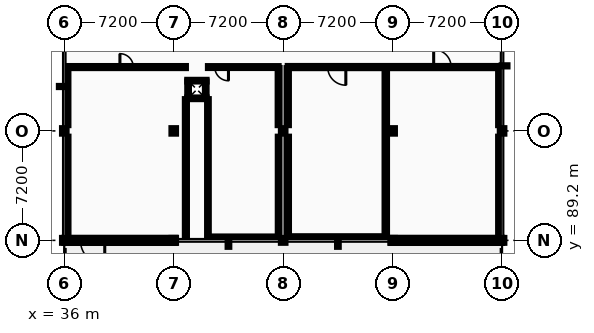
"""IFC4 building model, lengths in metres.
Left out: names, types, materials, properties, quantities, classifications, styles, units other than length and angle.
Written with IfcOpenShell. Run it as: python <this file> out.ifc"""

import sys

from ifc_helpers import new_model, si_unit, direction, frame, frame_2d, origin, origin_2d, place, context, subcontext, project, spatial, rectangle, i_section, extrude, element, fill, save


model = new_model("IFC4")
c1 = context("Model", 3, precision=1e-05, world=origin(), true_north=direction((0.0, 1.0)))
c2 = subcontext(c1, "Body", "Model", "MODEL_VIEW")
j1 = project(units=[si_unit("LENGTHUNIT", "METRE"), si_unit("PLANEANGLEUNIT", "RADIAN")], contexts=[c1])
p1 = place(None, origin())
s1 = spatial("IfcSite", under=j1, at=p1, CompositionType="ELEMENT")
p2 = place(p1, origin())
s2 = spatial("IfcBuilding", under=s1, at=p2, CompositionType="ELEMENT")
p3 = place(p2, frame((0.0, 0.0, 14.0)))
s3 = spatial("IfcBuildingStorey", under=s2, at=p3, CompositionType="ELEMENT", Elevation=14.0)
p4 = place(p3, frame((36.0, 89.2, 0.0), z_axis=(0.0, 0.0, 1.0), x_axis=(1.0, 0.0, 0.0)))
e1 = element("IfcColumn", 1, at=p4, inside=s3, PredefinedType="COLUMN", context=c2, shape_type="SweptSolid", body=[
    extrude(i_section(OverallWidth=0.3, OverallDepth=0.32, WebThickness=0.011, FlangeThickness=0.021, FilletRadius=0.027, at=origin_2d()), origin(), (0.0, 0.0, 1.0), 4.4),
])
p5 = place(p3, frame((36.0, 96.4, 0.0), z_axis=(0.0, 0.0, 1.0), x_axis=(1.0, 0.0, 0.0)))
e2 = element("IfcColumn", 2, at=p5, inside=s3, PredefinedType="COLUMN", context=c2, shape_type="SweptSolid", body=[
    extrude(i_section(OverallWidth=0.3, OverallDepth=0.36, WebThickness=0.012, FlangeThickness=0.022, FilletRadius=0.027, at=origin_2d()), origin(), (0.0, 0.0, 1.0), 4.4),
])
p6 = place(p3, frame((43.2, 89.2, 0.0), z_axis=(0.0, 0.0, 1.0), x_axis=(1.0, 0.0, 0.0)))
e3 = element("IfcColumn", 3, at=p6, inside=s3, PredefinedType="COLUMN", context=c2, shape_type="SweptSolid", body=[
    extrude(i_section(OverallWidth=0.3, OverallDepth=0.32, WebThickness=0.011, FlangeThickness=0.021, FilletRadius=0.027, at=origin_2d()), origin(), (0.0, 0.0, 1.0), 4.4),
])
p7 = place(p3, frame((43.2, 96.4, 0.0), z_axis=(0.0, 0.0, 1.0), x_axis=(1.0, 0.0, 0.0)))
e4 = element("IfcColumn", 4, at=p7, inside=s3, PredefinedType="COLUMN", context=c2, shape_type="SweptSolid", body=[
    extrude(i_section(OverallWidth=0.3, OverallDepth=0.36, WebThickness=0.012, FlangeThickness=0.022, FilletRadius=0.027, at=origin_2d()), origin(), (0.0, 0.0, 1.0), 4.4),
])
p8 = place(p3, frame((50.4, 89.2, 0.0), z_axis=(0.0, 0.0, 1.0), x_axis=(1.0, 0.0, 0.0)))
e5 = element("IfcColumn", 5, at=p8, inside=s3, PredefinedType="COLUMN", context=c2, shape_type="SweptSolid", body=[
    extrude(i_section(OverallWidth=0.3, OverallDepth=0.32, WebThickness=0.011, FlangeThickness=0.021, FilletRadius=0.027, at=origin_2d()), origin(), (0.0, 0.0, 1.0), 4.4),
])
p9 = place(p3, frame((50.4, 96.4, 0.0), z_axis=(0.0, 0.0, 1.0), x_axis=(1.0, 0.0, 0.0)))
e6 = element("IfcColumn", 6, at=p9, inside=s3, PredefinedType="COLUMN", context=c2, shape_type="SweptSolid", body=[
    extrude(i_section(OverallWidth=0.3, OverallDepth=0.36, WebThickness=0.012, FlangeThickness=0.022, FilletRadius=0.027, at=origin_2d()), origin(), (0.0, 0.0, 1.0), 4.4),
])
p10 = place(p3, frame((57.6, 89.2, 0.0), z_axis=(0.0, 0.0, 1.0), x_axis=(1.0, 0.0, 0.0)))
e7 = element("IfcColumn", 7, at=p10, inside=s3, PredefinedType="COLUMN", context=c2, shape_type="SweptSolid", body=[
    extrude(i_section(OverallWidth=0.3, OverallDepth=0.32, WebThickness=0.011, FlangeThickness=0.021, FilletRadius=0.027, at=origin_2d()), origin(), (0.0, 0.0, 1.0), 4.4),
])
p11 = place(p3, frame((57.6, 96.4, 0.0), z_axis=(0.0, 0.0, 1.0), x_axis=(1.0, 0.0, 0.0)))
e8 = element("IfcColumn", 8, at=p11, inside=s3, PredefinedType="COLUMN", context=c2, shape_type="SweptSolid", body=[
    extrude(i_section(OverallWidth=0.3, OverallDepth=0.36, WebThickness=0.012, FlangeThickness=0.022, FilletRadius=0.027, at=origin_2d()), origin(), (0.0, 0.0, 1.0), 4.4),
])
p12 = place(p3, frame((64.8, 89.2, 0.0), z_axis=(0.0, 0.0, 1.0), x_axis=(1.0, 0.0, 0.0)))
e9 = element("IfcColumn", 9, at=p12, inside=s3, PredefinedType="COLUMN", context=c2, shape_type="SweptSolid", body=[
    extrude(i_section(OverallWidth=0.3, OverallDepth=0.32, WebThickness=0.011, FlangeThickness=0.021, FilletRadius=0.027, at=origin_2d()), origin(), (0.0, 0.0, 1.0), 4.4),
])
p13 = place(p3, frame((64.8, 96.4, 0.0), z_axis=(0.0, 0.0, 1.0), x_axis=(1.0, 0.0, 0.0)))
e10 = element("IfcColumn", 10, at=p13, inside=s3, PredefinedType="COLUMN", context=c2, shape_type="SweptSolid", body=[
    extrude(i_section(OverallWidth=0.3, OverallDepth=0.36, WebThickness=0.012, FlangeThickness=0.022, FilletRadius=0.027, at=origin_2d()), origin(), (0.0, 0.0, 1.0), 4.4),
])
p14 = place(p3, frame((36.0, 89.2, 0.0), z_axis=(0.0, 0.0, 1.0), x_axis=(1.0, 0.0, 0.0)))
e11 = element("IfcWall", 11, at=p14, inside=s3, PredefinedType="STANDARD", context=c2, shape_type="SweptSolid", body=[
    extrude(rectangle(XDim=7.31, YDim=0.34, at=frame_2d((3.655, 0.0))), origin(), (0.0, 0.0, 1.0), 3.935),
])
p15 = place(p14, frame((1.062, 0.0, 0.0)))
e12 = element("IfcOpeningElement", 12, at=p15, cuts=e11, PredefinedType="OPENING", context=c2, shape_type="SweptSolid", body=[
    extrude(rectangle(XDim=1.6, YDim=2.2, at=frame_2d((0.8, 1.1))), frame((0.0, 0.18, 0.0), z_axis=(0.0, -1.0, 0.0), x_axis=(1.0, 0.0, 0.0)), (0.0, 0.0, 1.0), 0.36),
])
p16 = place(p3, frame((57.49, 89.2, 0.0), z_axis=(0.0, 0.0, 1.0), x_axis=(1.0, 0.0, 0.0)))
e13 = element("IfcWall", 13, at=p16, inside=s3, PredefinedType="STANDARD", context=c2, shape_type="SweptSolid", body=[
    extrude(rectangle(XDim=7.31, YDim=0.34, at=frame_2d((3.655, 0.0))), origin(), (0.0, 0.0, 1.0), 3.935),
])
for number, where, z_axis, x_axis in (
    (14, (44.09, 98.545, 0.0), (0.0, 0.0, 1.0), (1.0, 0.0, 0.0)),
    (15, (44.09, 99.705, 0.0), (0.0, 0.0, 1.0), (1.0, 0.0, 0.0)),
):
    element("IfcWall", number, at=place(p3, frame(where, z_axis=z_axis, x_axis=x_axis)), inside=s3, PredefinedType="PARTITIONING", context=c2, shape_type="SweptSolid", body=[
        extrude(rectangle(XDim=1.27, YDim=0.11, at=frame_2d((0.635, 0.0))), origin(), (0.0, 0.0, 1.0), 4.2),
    ])
for number, where, z_axis, x_axis in (
    (16, (44.145, 98.6, 0.0), (0.0, 0.0, 1.0), (0.0, 1.0, 0.0)),
    (17, (45.305, 98.6, 0.0), (0.0, 0.0, 1.0), (0.0, 1.0, 0.0)),
):
    element("IfcWall", number, at=place(p3, frame(where, z_axis=z_axis, x_axis=x_axis)), inside=s3, PredefinedType="PARTITIONING", context=c2, shape_type="SweptSolid", body=[
        extrude(rectangle(XDim=1.05, YDim=0.11, at=frame_2d((0.525, 0.0))), origin(), (0.0, 0.0, 1.0), 4.2),
    ])
p17 = place(p3, frame((45.45, 89.4, 0.0), z_axis=(0.0, 0.0, 1.0), x_axis=(1.0, 0.0, 0.0)))
e18 = element("IfcWall", 18, at=p17, inside=s3, PredefinedType="PARTITIONING", context=c2, shape_type="SweptSolid", body=[
    extrude(rectangle(XDim=4.57, YDim=0.11, at=frame_2d((2.285, 0.0))), origin(), (0.0, 0.0, 1.0), 3.935),
])
p18 = place(p3, frame((50.78, 89.4, 0.0), z_axis=(0.0, 0.0, 1.0), x_axis=(1.0, 0.0, 0.0)))
e19 = element("IfcWall", 19, at=p18, inside=s3, PredefinedType="PARTITIONING", context=c2, shape_type="SweptSolid", body=[
    extrude(rectangle(XDim=6.44, YDim=0.142, at=frame_2d((3.22, 0.0))), origin(), (0.0, 0.0, 1.0), 3.935),
])
p19 = place(p3, frame((36.2, 100.6, 0.0), z_axis=(0.0, 0.0, 1.0), x_axis=(1.0, 0.0, 0.0)))
e20 = element("IfcWall", 20, at=p19, inside=s3, PredefinedType="PARTITIONING", context=c2, shape_type="SweptSolid", body=[
    extrude(rectangle(XDim=7.8, YDim=0.135, at=frame_2d((3.9, 0.0))), origin(), (0.0, 0.0, 1.0), 4.2),
])
p20 = place(p19, frame((3.46, 0.0, 0.0)))
e21 = element("IfcOpeningElement", 21, at=p20, cuts=e20, PredefinedType="OPENING", context=c2, shape_type="SweptSolid", body=[
    extrude(rectangle(XDim=0.88, YDim=2.068, at=frame_2d((0.44, 1.034))), frame((0.0, 0.078, 0.0), z_axis=(0.0, -1.0, 0.0), x_axis=(1.0, 0.0, 0.0)), (0.0, 0.0, 1.0), 0.155),
])
p21 = place(p3, frame((45.45, 100.6, 0.0), z_axis=(0.0, 0.0, 1.0), x_axis=(1.0, 0.0, 0.0)))
e22 = element("IfcWall", 22, at=p21, inside=s3, PredefinedType="PARTITIONING", context=c2, shape_type="SweptSolid", body=[
    extrude(rectangle(XDim=4.65, YDim=0.125, at=frame_2d((2.325, 0.0))), origin(), (0.0, 0.0, 1.0), 4.2),
])
p22 = place(p21, frame((0.45, 0.0, 0.0)))
e23 = element("IfcOpeningElement", 23, at=p22, cuts=e22, PredefinedType="OPENING", context=c2, shape_type="SweptSolid", body=[
    extrude(rectangle(XDim=0.9, YDim=2.1, at=frame_2d((0.45, 1.05))), frame((0.0, 0.073, 0.0), z_axis=(0.0, -1.0, 0.0), x_axis=(1.0, 0.0, 0.0)), (0.0, 0.0, 1.0), 0.145),
])
p23 = place(p3, frame((50.7, 100.6, 0.0), z_axis=(0.0, 0.0, 1.0), x_axis=(1.0, 0.0, 0.0)))
e24 = element("IfcWall", 24, at=p23, inside=s3, PredefinedType="PARTITIONING", context=c2, shape_type="SweptSolid", body=[
    extrude(rectangle(XDim=13.9, YDim=0.142, at=frame_2d((6.95, 0.0))), origin(), (0.0, 0.0, 1.0), 4.2),
])
p24 = place(p23, frame((2.629, 0.0, 0.0)))
e25 = element("IfcOpeningElement", 25, at=p24, cuts=e24, PredefinedType="OPENING", context=c2, shape_type="SweptSolid", body=[
    extrude(rectangle(XDim=1.192, YDim=2.04, at=frame_2d((0.596, 1.02))), frame((0.0, 0.081, 0.0), z_axis=(0.0, -1.0, 0.0), x_axis=(1.0, 0.0, 0.0)), (0.0, 0.0, 1.0), 0.162),
])
p25 = place(p23, frame((9.6, 0.0, 0.0)))
e26 = element("IfcOpeningElement", 26, at=p25, cuts=e24, PredefinedType="OPENING", context=c2, shape_type="SweptSolid", body=[
    extrude(rectangle(XDim=1.15, YDim=2.15, at=frame_2d((0.575, 1.075))), frame((0.0, 0.081, 0.0), z_axis=(0.0, -1.0, 0.0), x_axis=(1.0, 0.0, 0.0)), (0.0, 0.0, 1.0), 0.162),
])
p26 = place(p3, frame((36.2, 89.58, 0.0), z_axis=(0.0, 0.0, 1.0), x_axis=(0.0, 1.0, 0.0)))
e27 = element("IfcWall", 27, at=p26, inside=s3, PredefinedType="PARTITIONING", context=c2, shape_type="SweptSolid", body=[
    extrude(rectangle(XDim=6.44, YDim=0.15, at=frame_2d((3.22, 0.0))), origin(), (0.0, 0.0, 1.0), 3.885),
])
p27 = place(p3, frame((36.2, 96.78, 0.0), z_axis=(0.0, 0.0, 1.0), x_axis=(0.0, 1.0, 0.0)))
e28 = element("IfcWall", 28, at=p27, inside=s3, PredefinedType="PARTITIONING", context=c2, shape_type="SweptSolid", body=[
    extrude(rectangle(XDim=3.752, YDim=0.142, at=frame_2d((1.876, 0.0))), origin(), (0.0, 0.0, 1.0), 3.885),
])
p28 = place(p3, frame((44.0, 89.4, 0.0), z_axis=(0.0, 0.0, 1.0), x_axis=(0.0, 1.0, 0.0)))
e29 = element("IfcWall", 29, at=p28, inside=s3, PredefinedType="PARTITIONING", context=c2, shape_type="SweptSolid", body=[
    extrude(rectangle(XDim=9.09, YDim=0.135, at=frame_2d((4.545, 0.0))), origin(), (0.0, 0.0, 1.0), 4.2),
])
p29 = place(p3, frame((45.45, 89.455, 0.0), z_axis=(0.0, 0.0, 1.0), x_axis=(0.0, 1.0, 0.0)))
e30 = element("IfcWall", 30, at=p29, inside=s3, PredefinedType="PARTITIONING", context=c2, shape_type="SweptSolid", body=[
    extrude(rectangle(XDim=9.035, YDim=0.11, at=frame_2d((4.518, 0.0))), origin(), (0.0, 0.0, 1.0), 3.945),
])
p30 = place(p3, frame((50.1, 89.58, 0.0), z_axis=(0.0, 0.0, 1.0), x_axis=(0.0, 1.0, 0.0)))
e31 = element("IfcWall", 31, at=p30, inside=s3, PredefinedType="PARTITIONING", context=c2, shape_type="SweptSolid", body=[
    extrude(rectangle(XDim=6.44, YDim=0.11, at=frame_2d((3.22, 0.0))), origin(), (0.0, 0.0, 1.0), 4.2),
])
p31 = place(p3, frame((50.1, 96.78, 0.0), z_axis=(0.0, 0.0, 1.0), x_axis=(0.0, 1.0, 0.0)))
e32 = element("IfcWall", 32, at=p31, inside=s3, PredefinedType="PARTITIONING", context=c2, shape_type="SweptSolid", body=[
    extrude(rectangle(XDim=3.758, YDim=0.125, at=frame_2d((1.879, 0.0))), origin(), (0.0, 0.0, 1.0), 4.2),
])
p32 = place(p3, frame((50.7, 89.58, 0.0), z_axis=(0.0, 0.0, 1.0), x_axis=(0.0, 1.0, 0.0)))
e33 = element("IfcWall", 33, at=p32, inside=s3, PredefinedType="PARTITIONING", context=c2, shape_type="SweptSolid", body=[
    extrude(rectangle(XDim=6.44, YDim=0.16, at=frame_2d((3.22, 0.0))), origin(), (0.0, 0.0, 1.0), 3.895),
])
p33 = place(p3, frame((50.7, 96.78, 0.0), z_axis=(0.0, 0.0, 1.0), x_axis=(0.0, 1.0, 0.0)))
e34 = element("IfcWall", 34, at=p33, inside=s3, PredefinedType="PARTITIONING", context=c2, shape_type="SweptSolid", body=[
    extrude(rectangle(XDim=3.749, YDim=0.15, at=frame_2d((1.875, 0.0))), origin(), (0.0, 0.0, 1.0), 3.895),
])
p34 = place(p3, frame((57.15, 89.471, 0.0), z_axis=(0.0, 0.0, 1.0), x_axis=(0.0, 1.0, 0.0)))
e35 = element("IfcWall", 35, at=p34, inside=s3, PredefinedType="PARTITIONING", context=c2, shape_type="SweptSolid", body=[
    extrude(rectangle(XDim=11.058, YDim=0.16, at=frame_2d((5.529, 0.0))), origin(), (0.0, 0.0, 1.0), 4.2),
])
p35 = place(p3, frame((64.6, 89.58, 0.0), z_axis=(0.0, 0.0, 1.0), x_axis=(0.0, 1.0, 0.0)))
e36 = element("IfcWall", 36, at=p35, inside=s3, PredefinedType="PARTITIONING", context=c2, shape_type="SweptSolid", body=[
    extrude(rectangle(XDim=6.44, YDim=0.118, at=frame_2d((3.22, 0.0))), origin(), (0.0, 0.0, 1.0), 3.885),
])
p36 = place(p3, frame((64.6, 96.78, 0.0), z_axis=(0.0, 0.0, 1.0), x_axis=(0.0, 1.0, 0.0)))
e37 = element("IfcWall", 37, at=p36, inside=s3, PredefinedType="PARTITIONING", context=c2, shape_type="SweptSolid", body=[
    extrude(rectangle(XDim=3.749, YDim=0.118, at=frame_2d((1.875, 0.0))), origin(), (0.0, 0.0, 1.0), 3.885),
])
p37 = place(p15, origin())
e38 = element("IfcDoor", 38, at=p37, inside=s3, OperationType="DOUBLE_DOOR_SINGLE_SWING", PredefinedType="DOOR", context=c2, shape_type="SweptSolid", body=[
    extrude(rectangle(XDim=1.6, YDim=2.2, at=frame_2d((0.8, 1.1))), frame((0.0, 0.025, 0.0), z_axis=(0.0, -1.0, 0.0), x_axis=(1.0, 0.0, 0.0)), (0.0, 0.0, 1.0), 0.05),
])
fill(e12, e38)
p38 = place(p22, origin())
e39 = element("IfcDoor", 39, at=p38, inside=s3, OperationType="SINGLE_SWING_RIGHT", PredefinedType="DOOR", context=c2, shape_type="SweptSolid", body=[
    extrude(rectangle(XDim=0.9, YDim=2.1, at=frame_2d((0.45, 1.05))), frame((0.0, 0.025, 0.0), z_axis=(0.0, -1.0, 0.0), x_axis=(1.0, 0.0, 0.0)), (0.0, 0.0, 1.0), 0.05),
])
fill(e23, e39)
p39 = place(p24, origin())
e40 = element("IfcDoor", 40, at=p39, inside=s3, OperationType="SINGLE_SWING_RIGHT", PredefinedType="DOOR", context=c2, shape_type="SweptSolid", body=[
    extrude(rectangle(XDim=1.192, YDim=2.04, at=frame_2d((0.596, 1.02))), frame((0.0, 0.025, 0.0), z_axis=(0.0, -1.0, 0.0), x_axis=(1.0, 0.0, 0.0)), (0.0, 0.0, 1.0), 0.05),
])
fill(e25, e40)
p40 = place(p25, origin())
e41 = element("IfcDoor", 41, at=p40, inside=s3, OperationType="SINGLE_SWING_LEFT", PredefinedType="DOOR", context=c2, shape_type="SweptSolid", body=[
    extrude(rectangle(XDim=1.15, YDim=2.15, at=frame_2d((0.575, 1.075))), frame((0.0, 0.025, 0.0), z_axis=(0.0, -1.0, 0.0), x_axis=(1.0, 0.0, 0.0)), (0.0, 0.0, 1.0), 0.05),
])
fill(e26, e41)
p41 = place(p20, origin())
e42 = element("IfcDoor", 42, at=p41, inside=s3, OperationType="SINGLE_SWING_LEFT", PredefinedType="DOOR", context=c2, shape_type="SweptSolid", body=[
    extrude(rectangle(XDim=0.88, YDim=2.068, at=frame_2d((0.44, 1.034))), frame((0.0, 0.025, 0.0), z_axis=(0.0, -1.0, 0.0), x_axis=(1.0, 0.0, 0.0)), (0.0, 0.0, 1.0), 0.05),
])
fill(e21, e42)
save(model, sys.argv[1])
